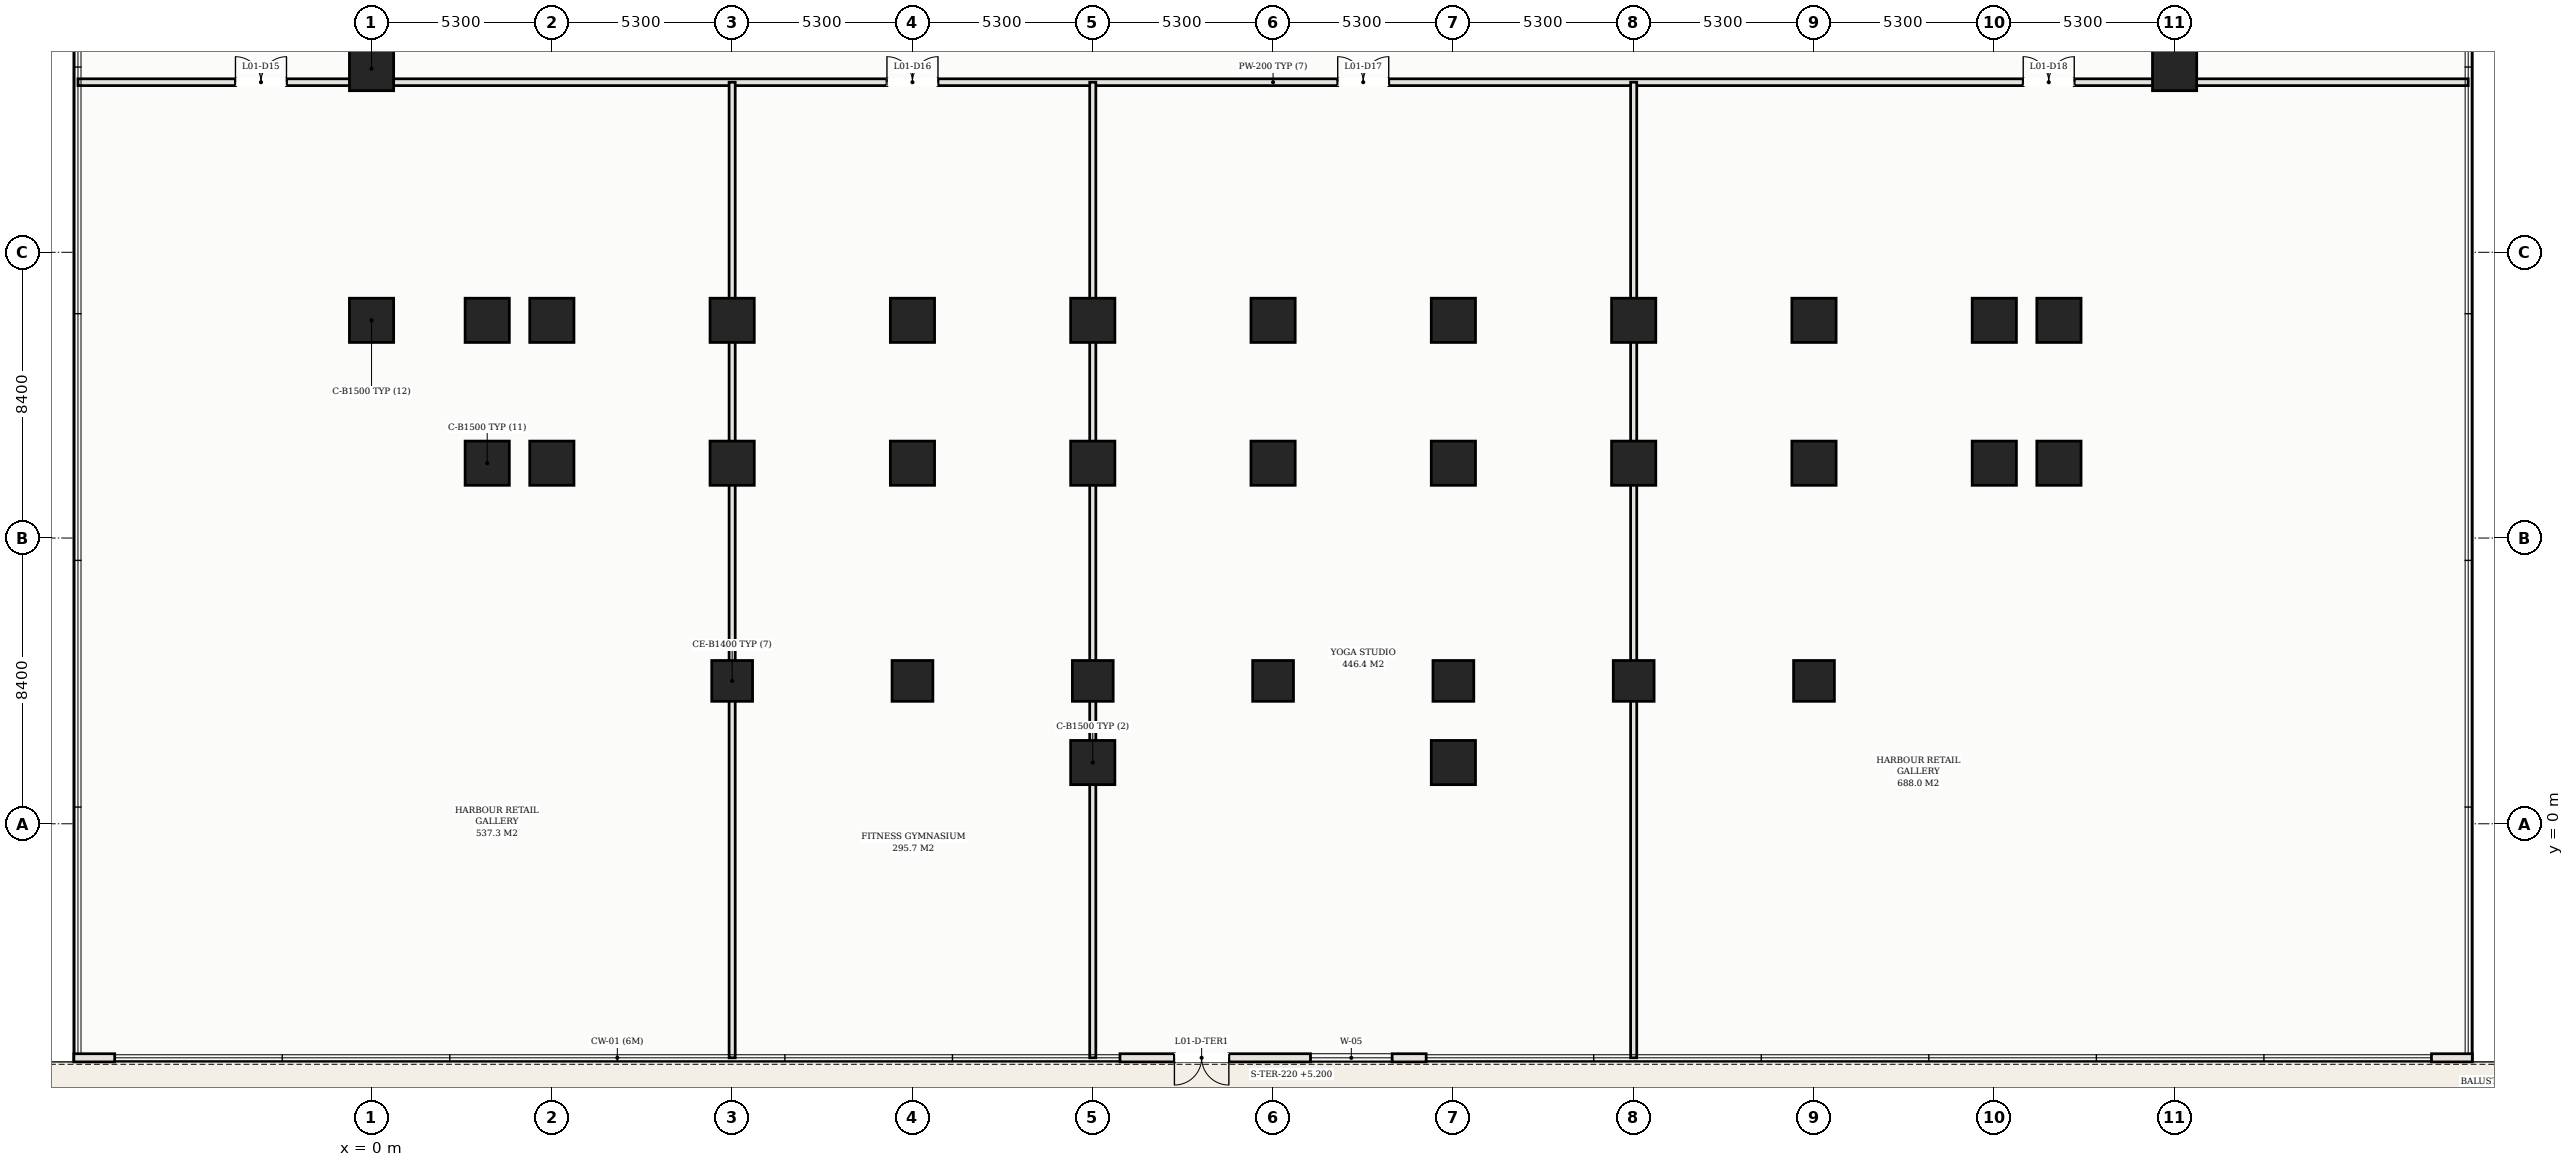
"""IFC4 building model, lengths in metres.
Left out: names, types, materials, properties, quantities, classifications, styles, units other than length and angle.
Written with IfcOpenShell. Run it as: python <this file> out.ifc"""

import sys

from ifc_helpers import new_model, si_unit, direction, frame, frame_2d, origin, origin_2d, place, context, subcontext, project, spatial, rectangle, hollow_rectangle, extrude, element, fill, save


model = new_model("IFC4")
c1 = context("Model", 3, precision=1e-05, world=origin(), true_north=direction((0.0, 1.0)))
c2 = subcontext(c1, "Body", "Model", "MODEL_VIEW")
j1 = project(units=[si_unit("LENGTHUNIT", "METRE"), si_unit("PLANEANGLEUNIT", "RADIAN")], contexts=[c1])
p1 = place(None, origin())
s1 = spatial("IfcSite", under=j1, at=p1, CompositionType="ELEMENT")
p2 = place(p1, origin())
s2 = spatial("IfcBuilding", under=s1, at=p2, CompositionType="ELEMENT")
p3 = place(p2, frame((0.0, 0.0, 5.2)))
s3 = spatial("IfcBuildingStorey", under=s2, at=p3, CompositionType="ELEMENT", Elevation=5.2)
for number, where, z_axis, x_axis in (
    (1, (21.2, 1.8, 0.0), (0.0, 0.0, 1.0), (1.0, 0.0, 0.0)),
    (2, (31.8, 1.8, 0.0), (0.0, 0.0, 1.0), (1.0, 0.0, 0.0)),
    (3, (10.6, 14.8, 0.0), (0.0, 0.0, 1.0), (1.0, 0.0, 0.0)),
):
    element("IfcColumn", number, at=place(p3, frame(where, z_axis=z_axis, x_axis=x_axis)), inside=s3, PredefinedType="COLUMN", context=c2, shape_type="SweptSolid", body=[
        extrude(hollow_rectangle(XDim=1.3, YDim=1.3, WallThickness=0.042, at=origin_2d()), origin(), (0.0, 0.0, 1.0), 4.6),
    ])
p4 = place(p3, frame((10.6, 4.2, 0.0), z_axis=(0.0, 0.0, 1.0), x_axis=(1.0, 0.0, 0.0)))
e4 = element("IfcColumn", 4, at=p4, inside=s3, PredefinedType="COLUMN", context=c2, shape_type="SweptSolid", body=[
    extrude(hollow_rectangle(XDim=1.2, YDim=1.2, WallThickness=0.04, at=origin_2d()), origin(), (0.0, 0.0, 1.0), 4.6),
])
for number, where, z_axis, x_axis in (
    (5, (10.6, 10.6, 0.0), (0.0, 0.0, 1.0), (1.0, 0.0, 0.0)),
    (6, (15.9, 14.8, 0.0), (0.0, 0.0, 1.0), (1.0, 0.0, 0.0)),
):
    element("IfcColumn", number, at=place(p3, frame(where, z_axis=z_axis, x_axis=x_axis)), inside=s3, PredefinedType="COLUMN", context=c2, shape_type="SweptSolid", body=[
        extrude(hollow_rectangle(XDim=1.3, YDim=1.3, WallThickness=0.042, at=origin_2d()), origin(), (0.0, 0.0, 1.0), 4.6),
    ])
p5 = place(p3, frame((15.9, 4.2, 0.0), z_axis=(0.0, 0.0, 1.0), x_axis=(1.0, 0.0, 0.0)))
e7 = element("IfcColumn", 7, at=p5, inside=s3, PredefinedType="COLUMN", context=c2, shape_type="SweptSolid", body=[
    extrude(hollow_rectangle(XDim=1.2, YDim=1.2, WallThickness=0.04, at=origin_2d()), origin(), (0.0, 0.0, 1.0), 4.6),
])
for number, where, z_axis, x_axis in (
    (8, (15.9, 10.6, 0.0), (0.0, 0.0, 1.0), (1.0, 0.0, 0.0)),
    (9, (21.2, 14.8, 0.0), (0.0, 0.0, 1.0), (1.0, 0.0, 0.0)),
):
    element("IfcColumn", number, at=place(p3, frame(where, z_axis=z_axis, x_axis=x_axis)), inside=s3, PredefinedType="COLUMN", context=c2, shape_type="SweptSolid", body=[
        extrude(hollow_rectangle(XDim=1.3, YDim=1.3, WallThickness=0.042, at=origin_2d()), origin(), (0.0, 0.0, 1.0), 4.6),
    ])
p6 = place(p3, frame((21.2, 4.2, 0.0), z_axis=(0.0, 0.0, 1.0), x_axis=(1.0, 0.0, 0.0)))
e10 = element("IfcColumn", 10, at=p6, inside=s3, PredefinedType="COLUMN", context=c2, shape_type="SweptSolid", body=[
    extrude(hollow_rectangle(XDim=1.2, YDim=1.2, WallThickness=0.04, at=origin_2d()), origin(), (0.0, 0.0, 1.0), 4.6),
])
for number, where, z_axis, x_axis in (
    (11, (21.2, 10.6, 0.0), (0.0, 0.0, 1.0), (1.0, 0.0, 0.0)),
    (12, (26.5, 14.8, 0.0), (0.0, 0.0, 1.0), (1.0, 0.0, 0.0)),
):
    element("IfcColumn", number, at=place(p3, frame(where, z_axis=z_axis, x_axis=x_axis)), inside=s3, PredefinedType="COLUMN", context=c2, shape_type="SweptSolid", body=[
        extrude(hollow_rectangle(XDim=1.3, YDim=1.3, WallThickness=0.042, at=origin_2d()), origin(), (0.0, 0.0, 1.0), 4.6),
    ])
p7 = place(p3, frame((26.5, 4.2, 0.0), z_axis=(0.0, 0.0, 1.0), x_axis=(1.0, 0.0, 0.0)))
e13 = element("IfcColumn", 13, at=p7, inside=s3, PredefinedType="COLUMN", context=c2, shape_type="SweptSolid", body=[
    extrude(hollow_rectangle(XDim=1.2, YDim=1.2, WallThickness=0.04, at=origin_2d()), origin(), (0.0, 0.0, 1.0), 4.6),
])
for number, where, z_axis, x_axis in (
    (14, (26.5, 10.6, 0.0), (0.0, 0.0, 1.0), (1.0, 0.0, 0.0)),
    (15, (31.8, 14.8, 0.0), (0.0, 0.0, 1.0), (1.0, 0.0, 0.0)),
):
    element("IfcColumn", number, at=place(p3, frame(where, z_axis=z_axis, x_axis=x_axis)), inside=s3, PredefinedType="COLUMN", context=c2, shape_type="SweptSolid", body=[
        extrude(hollow_rectangle(XDim=1.3, YDim=1.3, WallThickness=0.042, at=origin_2d()), origin(), (0.0, 0.0, 1.0), 4.6),
    ])
p8 = place(p3, frame((31.8, 4.2, 0.0), z_axis=(0.0, 0.0, 1.0), x_axis=(1.0, 0.0, 0.0)))
e16 = element("IfcColumn", 16, at=p8, inside=s3, PredefinedType="COLUMN", context=c2, shape_type="SweptSolid", body=[
    extrude(hollow_rectangle(XDim=1.2, YDim=1.2, WallThickness=0.04, at=origin_2d()), origin(), (0.0, 0.0, 1.0), 4.6),
])
for number, where, z_axis, x_axis in (
    (17, (31.8, 10.6, 0.0), (0.0, 0.0, 1.0), (1.0, 0.0, 0.0)),
    (18, (37.1, 14.8, 0.0), (0.0, 0.0, 1.0), (1.0, 0.0, 0.0)),
):
    element("IfcColumn", number, at=place(p3, frame(where, z_axis=z_axis, x_axis=x_axis)), inside=s3, PredefinedType="COLUMN", context=c2, shape_type="SweptSolid", body=[
        extrude(hollow_rectangle(XDim=1.3, YDim=1.3, WallThickness=0.042, at=origin_2d()), origin(), (0.0, 0.0, 1.0), 4.6),
    ])
p9 = place(p3, frame((37.1, 4.2, 0.0), z_axis=(0.0, 0.0, 1.0), x_axis=(1.0, 0.0, 0.0)))
e19 = element("IfcColumn", 19, at=p9, inside=s3, PredefinedType="COLUMN", context=c2, shape_type="SweptSolid", body=[
    extrude(hollow_rectangle(XDim=1.2, YDim=1.2, WallThickness=0.04, at=origin_2d()), origin(), (0.0, 0.0, 1.0), 4.6),
])
for number, where, z_axis, x_axis in (
    (20, (37.1, 10.6, 0.0), (0.0, 0.0, 1.0), (1.0, 0.0, 0.0)),
    (21, (42.4, 14.8, 0.0), (0.0, 0.0, 1.0), (1.0, 0.0, 0.0)),
):
    element("IfcColumn", number, at=place(p3, frame(where, z_axis=z_axis, x_axis=x_axis)), inside=s3, PredefinedType="COLUMN", context=c2, shape_type="SweptSolid", body=[
        extrude(hollow_rectangle(XDim=1.3, YDim=1.3, WallThickness=0.042, at=origin_2d()), origin(), (0.0, 0.0, 1.0), 4.6),
    ])
p10 = place(p3, frame((42.4, 4.2, 0.0), z_axis=(0.0, 0.0, 1.0), x_axis=(1.0, 0.0, 0.0)))
e22 = element("IfcColumn", 22, at=p10, inside=s3, PredefinedType="COLUMN", context=c2, shape_type="SweptSolid", body=[
    extrude(hollow_rectangle(XDim=1.2, YDim=1.2, WallThickness=0.04, at=origin_2d()), origin(), (0.0, 0.0, 1.0), 4.6),
])
for number, where, z_axis, x_axis in (
    (23, (42.4, 10.6, 0.0), (0.0, 0.0, 1.0), (1.0, 0.0, 0.0)),
    (24, (3.4, 10.6, 0.0), (0.0, 0.0, 1.0), (1.0, 0.0, 0.0)),
    (25, (3.4, 14.8, 0.0), (0.0, 0.0, 1.0), (1.0, 0.0, 0.0)),
    (26, (5.3, 10.6, 0.0), (0.0, 0.0, 1.0), (1.0, 0.0, 0.0)),
    (27, (5.3, 14.8, 0.0), (0.0, 0.0, 1.0), (1.0, 0.0, 0.0)),
    (28, (47.7, 10.6, 0.0), (0.0, 0.0, 1.0), (1.0, 0.0, 0.0)),
    (29, (47.7, 14.8, 0.0), (0.0, 0.0, 1.0), (1.0, 0.0, 0.0)),
    (30, (49.6, 10.6, 0.0), (0.0, 0.0, 1.0), (1.0, 0.0, 0.0)),
    (31, (49.6, 14.8, 0.0), (0.0, 0.0, 1.0), (1.0, 0.0, 0.0)),
    (32, (0.0, 14.8, 0.0), (0.0, 0.0, 1.0), (1.0, 0.0, 0.0)),
    (33, (0.0, 22.2, 0.0), (0.0, 0.0, 1.0), (1.0, 0.0, 0.0)),
    (34, (53.0, 22.2, 0.0), (0.0, 0.0, 1.0), (1.0, 0.0, 0.0)),
):
    element("IfcColumn", number, at=place(p3, frame(where, z_axis=z_axis, x_axis=x_axis)), inside=s3, PredefinedType="COLUMN", context=c2, shape_type="SweptSolid", body=[
        extrude(hollow_rectangle(XDim=1.3, YDim=1.3, WallThickness=0.042, at=origin_2d()), origin(), (0.0, 0.0, 1.0), 4.6),
    ])
p11 = place(p3, frame((-8.75, -6.88, 0.0), z_axis=(0.0, 0.0, 1.0), x_axis=(1.0, 0.0, 0.0)))
e35 = element("IfcWall", 35, at=p11, inside=s3, PredefinedType="SOLIDWALL", context=c2, shape_type="SweptSolid", body=[
    extrude(rectangle(XDim=1.2, YDim=0.24, at=frame_2d((0.6, 0.0))), origin(), (0.0, 0.0, 1.0), 4.35),
])
p12 = place(p3, frame((22.0, -6.88, 0.0), z_axis=(0.0, 0.0, 1.0), x_axis=(1.0, 0.0, 0.0)))
e36 = element("IfcWall", 36, at=p12, inside=s3, PredefinedType="SOLIDWALL", context=c2, shape_type="SweptSolid", body=[
    extrude(rectangle(XDim=9.0, YDim=0.24, at=frame_2d((4.5, 0.0))), origin(), (0.0, 0.0, 1.0), 4.35),
])
p13 = place(p12, frame((1.6, 0.0, 0.0)))
e37 = element("IfcOpeningElement", 37, at=p13, cuts=e36, PredefinedType="OPENING", context=c2, shape_type="SweptSolid", body=[
    extrude(rectangle(XDim=1.6, YDim=2.25, at=frame_2d((0.8, 1.125))), frame((0.0, 0.13, 0.0), z_axis=(0.0, -1.0, 0.0), x_axis=(1.0, 0.0, 0.0)), (0.0, 0.0, 1.0), 0.26),
])
p14 = place(p12, frame((5.6, 0.0, 0.75)))
e38 = element("IfcOpeningElement", 38, at=p14, cuts=e36, PredefinedType="OPENING", context=c2, shape_type="SweptSolid", body=[
    extrude(rectangle(XDim=2.4, YDim=2.0, at=frame_2d((1.2, 1.0))), frame((0.0, 0.13, 0.0), z_axis=(0.0, -1.0, 0.0), x_axis=(1.0, 0.0, 0.0)), (0.0, 0.0, 1.0), 0.26),
])
p15 = place(p3, frame((60.55, -6.88, 0.0), z_axis=(0.0, 0.0, 1.0), x_axis=(1.0, 0.0, 0.0)))
e39 = element("IfcWall", 39, at=p15, inside=s3, PredefinedType="SOLIDWALL", context=c2, shape_type="SweptSolid", body=[
    extrude(rectangle(XDim=1.2, YDim=0.24, at=frame_2d((0.6, 0.0))), origin(), (0.0, 0.0, 1.0), 4.35),
])
p16 = place(p3, frame((-8.63, 21.8, 0.0), z_axis=(0.0, 0.0, 1.0), x_axis=(1.0, 0.0, 0.0)))
e40 = element("IfcWall", 40, at=p16, inside=s3, PredefinedType="PARTITIONING", context=c2, shape_type="SweptSolid", body=[
    extrude(rectangle(XDim=70.26, YDim=0.2, at=frame_2d((35.13, 0.0))), origin(), (0.0, 0.0, 1.0), 4.35),
])
p17 = place(p16, frame((4.63, 0.0, 0.0)))
e41 = element("IfcOpeningElement", 41, at=p17, cuts=e40, PredefinedType="OPENING", context=c2, shape_type="SweptSolid", body=[
    extrude(rectangle(XDim=1.5, YDim=2.25, at=frame_2d((0.75, 1.125))), frame((0.0, 0.11, 0.0), z_axis=(0.0, -1.0, 0.0), x_axis=(1.0, 0.0, 0.0)), (0.0, 0.0, 1.0), 0.22),
])
p18 = place(p16, frame((23.78, 0.0, 0.0)))
e42 = element("IfcOpeningElement", 42, at=p18, cuts=e40, PredefinedType="OPENING", context=c2, shape_type="SweptSolid", body=[
    extrude(rectangle(XDim=1.5, YDim=2.25, at=frame_2d((0.75, 1.125))), frame((0.0, 0.11, 0.0), z_axis=(0.0, -1.0, 0.0), x_axis=(1.0, 0.0, 0.0)), (0.0, 0.0, 1.0), 0.22),
])
p19 = place(p16, frame((37.03, 0.0, 0.0)))
e43 = element("IfcOpeningElement", 43, at=p19, cuts=e40, PredefinedType="OPENING", context=c2, shape_type="SweptSolid", body=[
    extrude(rectangle(XDim=1.5, YDim=2.25, at=frame_2d((0.75, 1.125))), frame((0.0, 0.11, 0.0), z_axis=(0.0, -1.0, 0.0), x_axis=(1.0, 0.0, 0.0)), (0.0, 0.0, 1.0), 0.22),
])
p20 = place(p16, frame((57.18, 0.0, 0.0)))
e44 = element("IfcOpeningElement", 44, at=p20, cuts=e40, PredefinedType="OPENING", context=c2, shape_type="SweptSolid", body=[
    extrude(rectangle(XDim=1.5, YDim=2.25, at=frame_2d((0.75, 1.125))), frame((0.0, 0.11, 0.0), z_axis=(0.0, -1.0, 0.0), x_axis=(1.0, 0.0, 0.0)), (0.0, 0.0, 1.0), 0.22),
])
for number, where, z_axis, x_axis in (
    (45, (10.6, -6.88, 0.0), (0.0, 0.0, 1.0), (0.0, 1.0, 0.0)),
    (46, (21.2, -6.88, 0.0), (0.0, 0.0, 1.0), (0.0, 1.0, 0.0)),
    (47, (37.1, -6.88, 0.0), (0.0, 0.0, 1.0), (0.0, 1.0, 0.0)),
):
    element("IfcWall", number, at=place(p3, frame(where, z_axis=z_axis, x_axis=x_axis)), inside=s3, PredefinedType="PARTITIONING", context=c2, shape_type="SweptSolid", body=[
        extrude(rectangle(XDim=28.68, YDim=0.18, at=frame_2d((14.34, 0.0))), origin(), (0.0, 0.0, 1.0), 3.495),
    ])
p21 = place(p13, frame((1.6, 0.0, 0.0), z_axis=(0.0, 0.0, 1.0), x_axis=(-1.0, 0.0, 0.0)))
e48 = element("IfcDoor", 48, at=p21, inside=s3, OperationType="DOUBLE_DOOR_SINGLE_SWING", PredefinedType="DOOR", context=c2, shape_type="SweptSolid", body=[
    extrude(rectangle(XDim=1.6, YDim=2.25, at=frame_2d((0.8, 1.125))), frame((0.0, 0.025, 0.0), z_axis=(0.0, -1.0, 0.0), x_axis=(1.0, 0.0, 0.0)), (0.0, 0.0, 1.0), 0.05),
])
fill(e37, e48)
p22 = place(p14, origin())
e49 = element("IfcWindow", 49, at=p22, inside=s3, PartitioningType="SINGLE_PANEL", PredefinedType="WINDOW", context=c2, shape_type="SweptSolid", body=[
    extrude(rectangle(XDim=2.4, YDim=2.0, at=frame_2d((1.2, 1.0))), frame((0.0, 0.03, 0.0), z_axis=(0.0, -1.0, 0.0), x_axis=(1.0, 0.0, 0.0)), (0.0, 0.0, 1.0), 0.06),
])
fill(e38, e49)
p23 = place(p17, origin())
e50 = element("IfcDoor", 50, at=p23, inside=s3, OperationType="DOUBLE_DOOR_SINGLE_SWING", PredefinedType="DOOR", context=c2, shape_type="SweptSolid", body=[
    extrude(rectangle(XDim=1.5, YDim=2.25, at=frame_2d((0.75, 1.125))), frame((0.0, 0.025, 0.0), z_axis=(0.0, -1.0, 0.0), x_axis=(1.0, 0.0, 0.0)), (0.0, 0.0, 1.0), 0.05),
])
fill(e41, e50)
p24 = place(p18, origin())
e51 = element("IfcDoor", 51, at=p24, inside=s3, OperationType="DOUBLE_DOOR_SINGLE_SWING", PredefinedType="DOOR", context=c2, shape_type="SweptSolid", body=[
    extrude(rectangle(XDim=1.5, YDim=2.25, at=frame_2d((0.75, 1.125))), frame((0.0, 0.025, 0.0), z_axis=(0.0, -1.0, 0.0), x_axis=(1.0, 0.0, 0.0)), (0.0, 0.0, 1.0), 0.05),
])
fill(e42, e51)
p25 = place(p19, origin())
e52 = element("IfcDoor", 52, at=p25, inside=s3, OperationType="DOUBLE_DOOR_SINGLE_SWING", PredefinedType="DOOR", context=c2, shape_type="SweptSolid", body=[
    extrude(rectangle(XDim=1.5, YDim=2.25, at=frame_2d((0.75, 1.125))), frame((0.0, 0.025, 0.0), z_axis=(0.0, -1.0, 0.0), x_axis=(1.0, 0.0, 0.0)), (0.0, 0.0, 1.0), 0.05),
])
fill(e43, e52)
p26 = place(p20, origin())
e53 = element("IfcDoor", 53, at=p26, inside=s3, OperationType="DOUBLE_DOOR_SINGLE_SWING", PredefinedType="DOOR", context=c2, shape_type="SweptSolid", body=[
    extrude(rectangle(XDim=1.5, YDim=2.25, at=frame_2d((0.75, 1.125))), frame((0.0, 0.025, 0.0), z_axis=(0.0, -1.0, 0.0), x_axis=(1.0, 0.0, 0.0)), (0.0, 0.0, 1.0), 0.05),
])
fill(e44, e53)
save(model, sys.argv[1])
